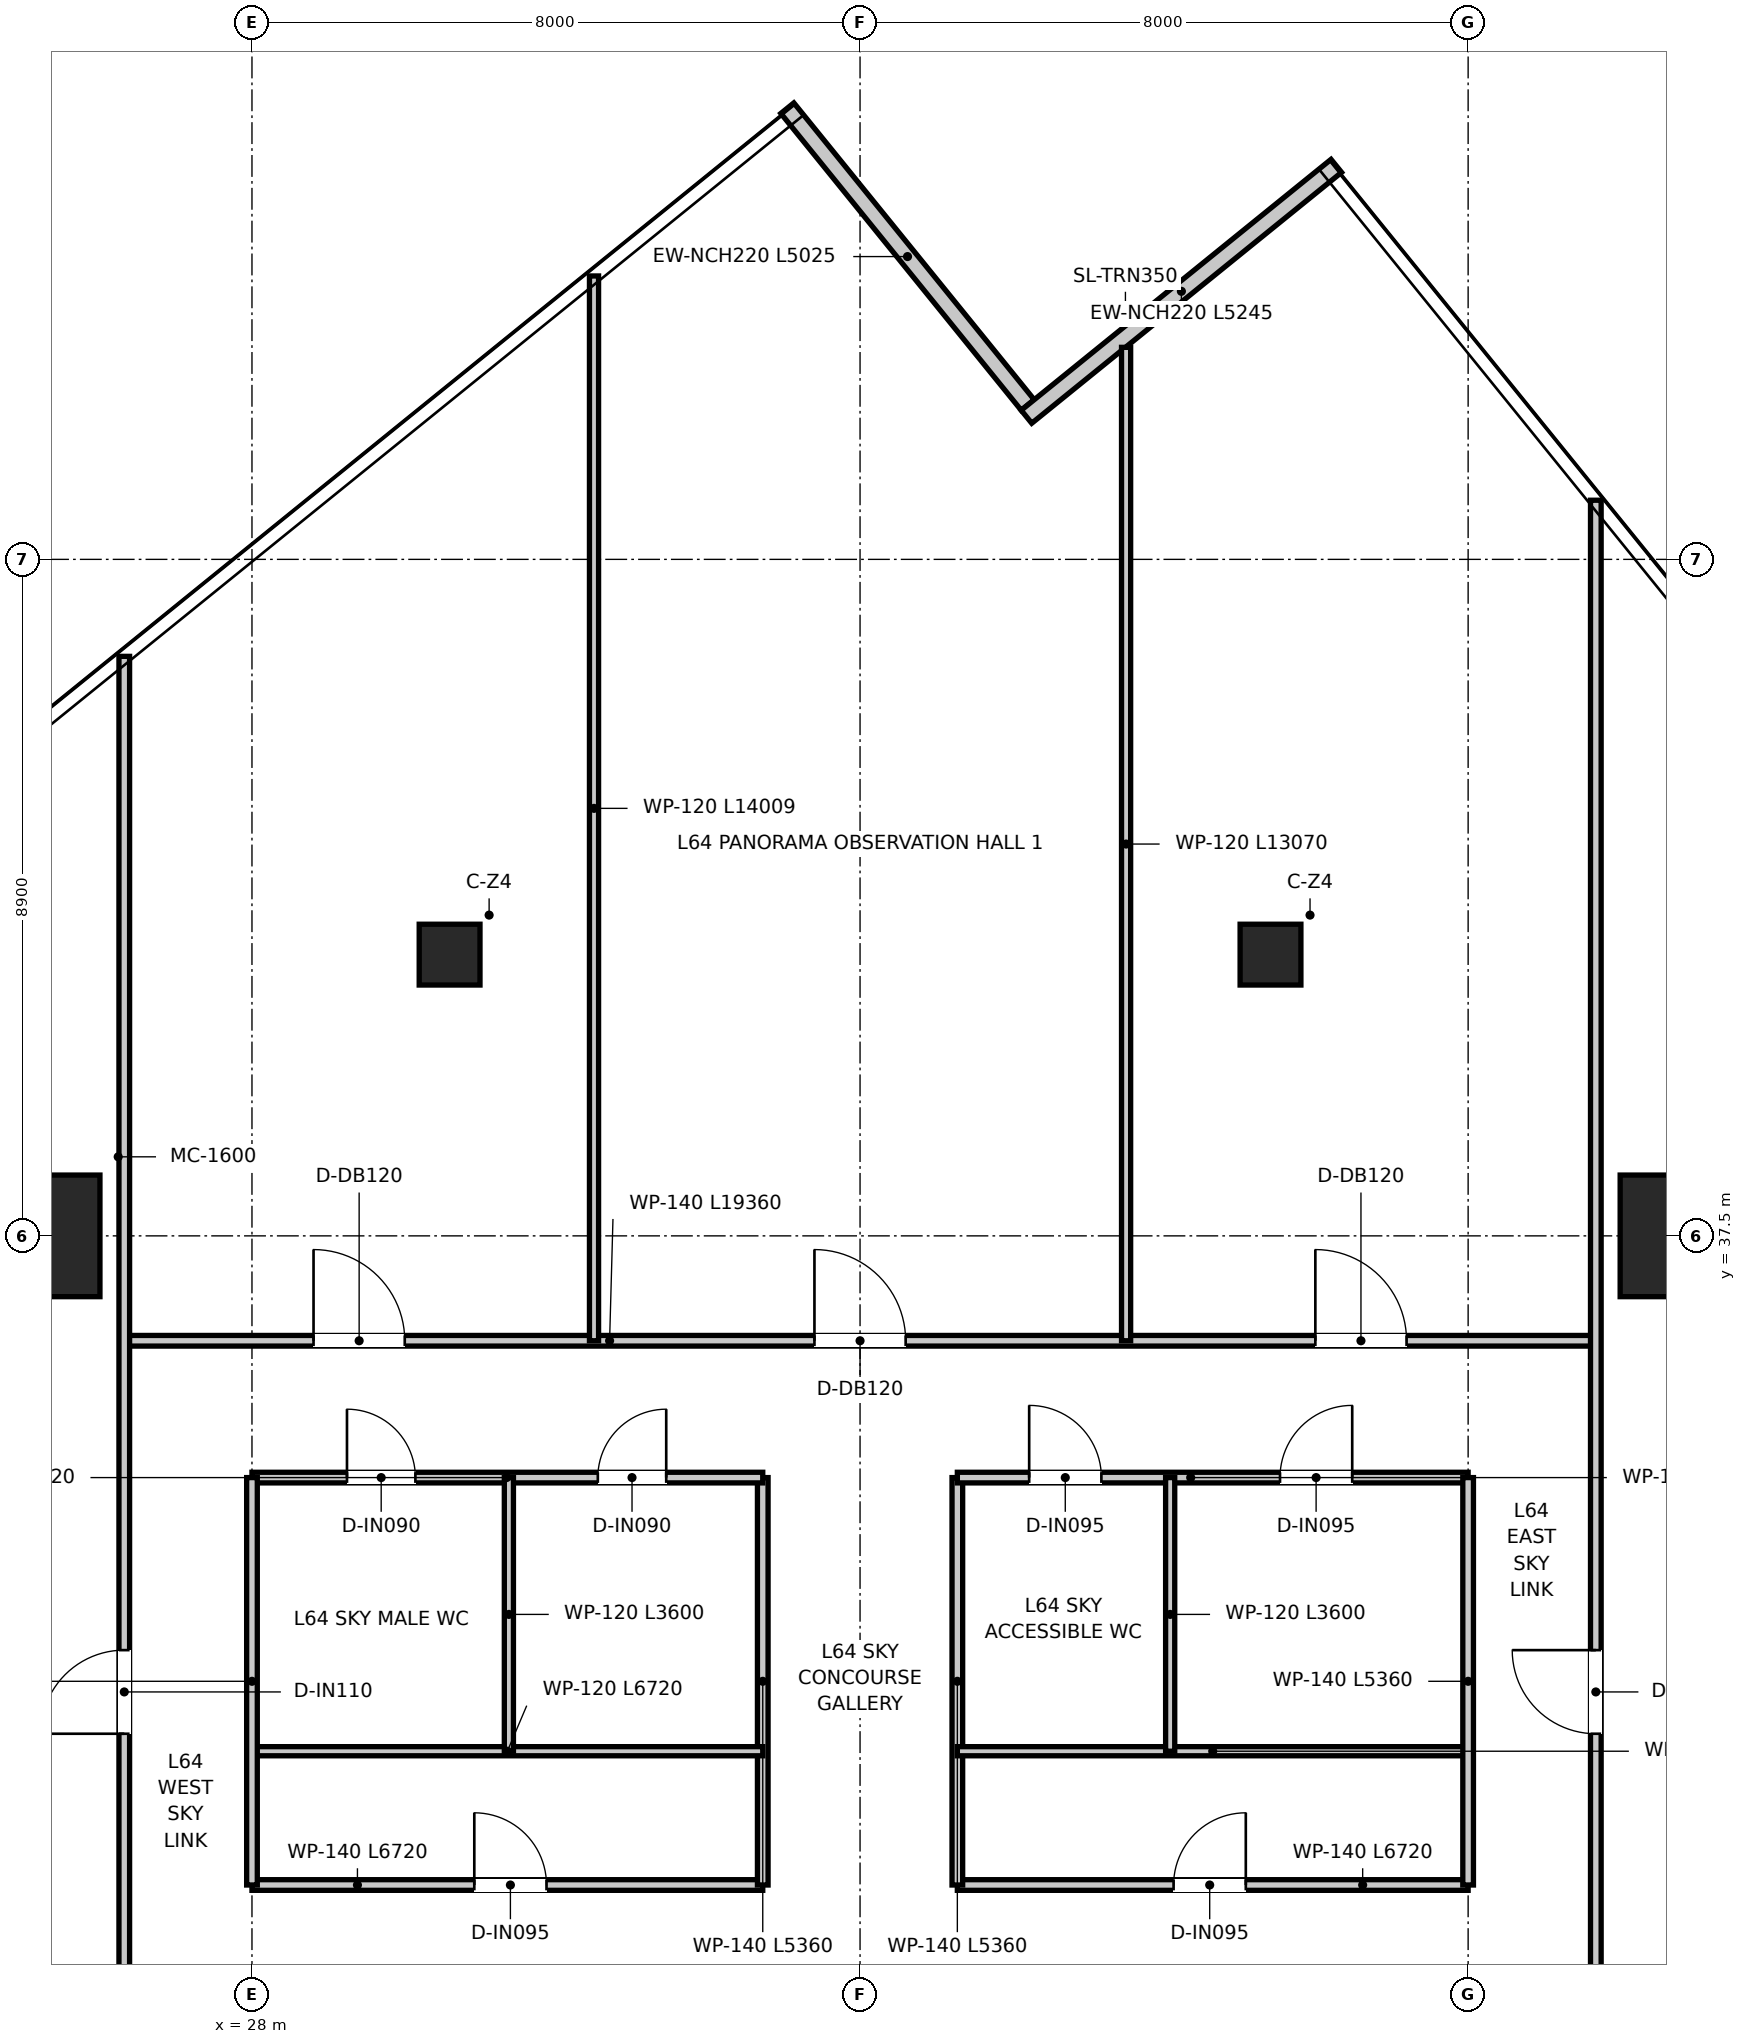
"""IFC4 building model, lengths in metres.
Left out: names, types, materials, properties, quantities, classifications, styles, units other than length and angle.
Written with IfcOpenShell. Run it as: python <this file> out.ifc"""

import sys

from ifc_helpers import new_model, si_unit, direction, frame, frame_2d, origin, origin_2d, place, context, subcontext, project, spatial, rectangle, extrude, source, transform, mapped, element, fill, save


model = new_model("IFC4")
c1 = context("Model", 3, precision=1e-05, world=origin(), true_north=direction((0.0, 1.0)))
c2 = subcontext(c1, "Body", "Model", "MODEL_VIEW")
j1 = project(units=[si_unit("LENGTHUNIT", "METRE"), si_unit("PLANEANGLEUNIT", "RADIAN")], contexts=[c1])
p1 = place(None, origin())
s1 = spatial("IfcSite", under=j1, at=p1, CompositionType="ELEMENT")
p2 = place(p1, origin())
s2 = spatial("IfcBuilding", under=s1, at=p2, CompositionType="ELEMENT")
p3 = place(p2, frame((0.0, 0.0, 262.6)))
s3 = spatial("IfcBuildingStorey", under=s2, at=p3, CompositionType="ELEMENT", Elevation=262.6)
m1 = source(origin(), c2, "Body", "SweptSolid", [
    extrude(rectangle(XDim=1.6, YDim=1.6, at=origin_2d()), origin(), (0.0, 0.0, 1.0), 4.8),
])
for number, where, z_axis, x_axis in (
    (1, (46.8, 37.5, 0.0), (0.0, 0.0, 1.0), (1.0, 0.0, 0.0)),
    (2, (25.2, 37.5, 0.0), (0.0, 0.0, 1.0), (1.0, 0.0, 0.0)),
):
    element("IfcColumn", number, at=place(p3, frame(where, z_axis=z_axis, x_axis=x_axis)), inside=s3, PredefinedType="USERDEFINED", context=c2, shape_type="MappedRepresentation", body=[
        mapped(m1, transform((0.0, 0.0, 0.0), x_axis=(1.0, 0.0, 0.0), y_axis=(0.0, 1.0, 0.0), z_axis=(0.0, 0.0, 1.0), scale=1.0)),
    ])
m2 = source(origin(), c2, "Body", "SweptSolid", [
    extrude(rectangle(XDim=0.8, YDim=0.8, at=origin_2d()), origin(), (0.0, 0.0, 1.0), 4.8),
])
for number, where, z_axis, x_axis in (
    (3, (30.6, 41.2, 0.0), (0.0, 0.0, 1.0), (1.0, 0.0, 0.0)),
    (4, (41.4, 41.2, 0.0), (0.0, 0.0, 1.0), (1.0, 0.0, 0.0)),
):
    element("IfcColumn", number, at=place(p3, frame(where, z_axis=z_axis, x_axis=x_axis)), inside=s3, PredefinedType="COLUMN", context=c2, shape_type="MappedRepresentation", body=[
        mapped(m2, transform((0.0, 0.0, 0.0), x_axis=(1.0, 0.0, 0.0), y_axis=(0.0, 1.0, 0.0), z_axis=(0.0, 0.0, 1.0), scale=1.0)),
    ])
p4 = place(p3, frame((38.206, 48.431, 0.0), z_axis=(0.0, 0.0, 1.0), x_axis=(-0.629311429887, 0.777153217978, 0.0)))
e5 = element("IfcWall", 5, at=p4, inside=s3, PredefinedType="ELEMENTEDWALL", context=c2, shape_type="SweptSolid", body=[
    extrude(rectangle(XDim=5.025, YDim=0.22, at=frame_2d((2.513, 0.0))), origin(), (0.0, 0.0, 1.0), 4.52),
])
p5 = place(p3, frame((42.266, 51.577, 0.0), z_axis=(0.0, 0.0, 1.0), x_axis=(-0.777149472214, -0.629316055602, 0.0)))
e6 = element("IfcWall", 6, at=p5, inside=s3, PredefinedType="ELEMENTEDWALL", context=c2, shape_type="SweptSolid", body=[
    extrude(rectangle(XDim=5.245, YDim=0.22, at=frame_2d((2.623, 0.0))), origin(), (0.0, 0.0, 1.0), 4.52),
])
p6 = place(p3, frame((28.0, 28.96, 0.0), z_axis=(0.0, 0.0, 1.0), x_axis=(1.0, 0.0, 0.0)))
e7 = element("IfcWall", 7, at=p6, inside=s3, PredefinedType="PARTITIONING", context=c2, shape_type="SweptSolid", body=[
    extrude(rectangle(XDim=6.72, YDim=0.14, at=frame_2d((3.36, 0.0))), origin(), (0.0, 0.0, 1.0), 4.03),
])
p7 = place(p6, frame((2.925, 0.0, 0.0)))
e8 = element("IfcOpeningElement", 8, at=p7, cuts=e7, PredefinedType="OPENING", context=c2, shape_type="SweptSolid", body=[
    extrude(rectangle(XDim=0.95, YDim=2.1, at=frame_2d((0.475, 1.05))), frame((0.0, 0.08, 0.0), z_axis=(0.0, -1.0, 0.0), x_axis=(1.0, 0.0, 0.0)), (0.0, 0.0, 1.0), 0.16),
])
p8 = place(p3, frame((37.28, 28.96, 0.0), z_axis=(0.0, 0.0, 1.0), x_axis=(1.0, 0.0, 0.0)))
e9 = element("IfcWall", 9, at=p8, inside=s3, PredefinedType="PARTITIONING", context=c2, shape_type="SweptSolid", body=[
    extrude(rectangle(XDim=6.72, YDim=0.14, at=frame_2d((3.36, 0.0))), origin(), (0.0, 0.0, 1.0), 4.03),
])
p9 = place(p8, frame((2.845, 0.0, 0.0)))
e10 = element("IfcOpeningElement", 10, at=p9, cuts=e9, PredefinedType="OPENING", context=c2, shape_type="SweptSolid", body=[
    extrude(rectangle(XDim=0.95, YDim=2.1, at=frame_2d((0.475, 1.05))), frame((0.0, 0.08, 0.0), z_axis=(0.0, -1.0, 0.0), x_axis=(1.0, 0.0, 0.0)), (0.0, 0.0, 1.0), 0.16),
])
for number, where, z_axis, x_axis in (
    (11, (34.72, 28.96, 0.0), (0.0, 0.0, 1.0), (0.0, 1.0, 0.0)),
    (12, (37.28, 28.96, 0.0), (0.0, 0.0, 1.0), (0.0, 1.0, 0.0)),
):
    element("IfcWall", number, at=place(p3, frame(where, z_axis=z_axis, x_axis=x_axis)), inside=s3, PredefinedType="PARTITIONING", context=c2, shape_type="SweptSolid", body=[
        extrude(rectangle(XDim=5.36, YDim=0.14, at=frame_2d((2.68, 0.0))), origin(), (0.0, 0.0, 1.0), 4.12),
    ])
for number, where, z_axis, x_axis in (
    (13, (28.0, 30.72, 0.0), (0.0, 0.0, 1.0), (1.0, 0.0, 0.0)),
    (14, (37.28, 30.72, 0.0), (0.0, 0.0, 1.0), (1.0, 0.0, 0.0)),
):
    element("IfcWall", number, at=place(p3, frame(where, z_axis=z_axis, x_axis=x_axis)), inside=s3, PredefinedType="PARTITIONING", context=c2, shape_type="SweptSolid", body=[
        extrude(rectangle(XDim=6.72, YDim=0.12, at=frame_2d((3.36, 0.0))), origin(), (0.0, 0.0, 1.0), 4.03),
    ])
p10 = place(p3, frame((28.0, 34.32, 0.0), z_axis=(0.0, 0.0, 1.0), x_axis=(1.0, 0.0, 0.0)))
e15 = element("IfcWall", 15, at=p10, inside=s3, PredefinedType="PARTITIONING", context=c2, shape_type="SweptSolid", body=[
    extrude(rectangle(XDim=6.72, YDim=0.14, at=frame_2d((3.36, 0.0))), origin(), (0.0, 0.0, 1.0), 4.03),
])
p11 = place(p10, frame((1.25, 0.0, 0.0)))
e16 = element("IfcOpeningElement", 16, at=p11, cuts=e15, PredefinedType="OPENING", context=c2, shape_type="SweptSolid", body=[
    extrude(rectangle(XDim=0.9, YDim=2.1, at=frame_2d((0.45, 1.05))), frame((0.0, 0.08, 0.0), z_axis=(0.0, -1.0, 0.0), x_axis=(1.0, 0.0, 0.0)), (0.0, 0.0, 1.0), 0.16),
])
p12 = place(p10, frame((4.55, 0.0, 0.0)))
e17 = element("IfcOpeningElement", 17, at=p12, cuts=e15, PredefinedType="OPENING", context=c2, shape_type="SweptSolid", body=[
    extrude(rectangle(XDim=0.9, YDim=2.1, at=frame_2d((0.45, 1.05))), frame((0.0, 0.08, 0.0), z_axis=(0.0, -1.0, 0.0), x_axis=(1.0, 0.0, 0.0)), (0.0, 0.0, 1.0), 0.16),
])
p13 = place(p3, frame((37.28, 34.32, 0.0), z_axis=(0.0, 0.0, 1.0), x_axis=(1.0, 0.0, 0.0)))
e18 = element("IfcWall", 18, at=p13, inside=s3, PredefinedType="PARTITIONING", context=c2, shape_type="SweptSolid", body=[
    extrude(rectangle(XDim=6.72, YDim=0.14, at=frame_2d((3.36, 0.0))), origin(), (0.0, 0.0, 1.0), 4.03),
])
p14 = place(p13, frame((0.945, 0.0, 0.0)))
e19 = element("IfcOpeningElement", 19, at=p14, cuts=e18, PredefinedType="OPENING", context=c2, shape_type="SweptSolid", body=[
    extrude(rectangle(XDim=0.95, YDim=2.1, at=frame_2d((0.475, 1.05))), frame((0.0, 0.08, 0.0), z_axis=(0.0, -1.0, 0.0), x_axis=(1.0, 0.0, 0.0)), (0.0, 0.0, 1.0), 0.16),
])
p15 = place(p13, frame((4.245, 0.0, 0.0)))
e20 = element("IfcOpeningElement", 20, at=p15, cuts=e18, PredefinedType="OPENING", context=c2, shape_type="SweptSolid", body=[
    extrude(rectangle(XDim=0.95, YDim=2.1, at=frame_2d((0.475, 1.05))), frame((0.0, 0.08, 0.0), z_axis=(0.0, -1.0, 0.0), x_axis=(1.0, 0.0, 0.0)), (0.0, 0.0, 1.0), 0.16),
])
for number, where, z_axis, x_axis in (
    (21, (28.0, 28.96, 0.0), (0.0, 0.0, 1.0), (0.0, 1.0, 0.0)),
    (22, (44.0, 28.96, 0.0), (0.0, 0.0, 1.0), (0.0, 1.0, 0.0)),
):
    element("IfcWall", number, at=place(p3, frame(where, z_axis=z_axis, x_axis=x_axis)), inside=s3, PredefinedType="PARTITIONING", context=c2, shape_type="SweptSolid", body=[
        extrude(rectangle(XDim=5.36, YDim=0.14, at=frame_2d((2.68, 0.0))), origin(), (0.0, 0.0, 1.0), 4.22),
    ])
for number, where, z_axis, x_axis in (
    (23, (31.38, 30.72, 0.0), (0.0, 0.0, 1.0), (0.0, 1.0, 0.0)),
    (24, (40.08, 30.72, 0.0), (0.0, 0.0, 1.0), (0.0, 1.0, 0.0)),
):
    element("IfcWall", number, at=place(p3, frame(where, z_axis=z_axis, x_axis=x_axis)), inside=s3, PredefinedType="PARTITIONING", context=c2, shape_type="SweptSolid", body=[
        extrude(rectangle(XDim=3.6, YDim=0.12, at=frame_2d((1.8, 0.0))), origin(), (0.0, 0.0, 1.0), 4.12),
    ])
p16 = place(p3, frame((26.32, 36.12, 0.0), z_axis=(0.0, 0.0, 1.0), x_axis=(1.0, 0.0, 0.0)))
e25 = element("IfcWall", 25, at=p16, inside=s3, PredefinedType="PARTITIONING", context=c2, shape_type="SweptSolid", body=[
    extrude(rectangle(XDim=19.36, YDim=0.14, at=frame_2d((9.68, 0.0))), origin(), (0.0, 0.0, 1.0), 4.03),
])
p17 = place(p16, frame((2.49, 0.0, 0.0)))
e26 = element("IfcOpeningElement", 26, at=p17, cuts=e25, PredefinedType="OPENING", context=c2, shape_type="SweptSolid", body=[
    extrude(rectangle(XDim=1.2, YDim=2.15, at=frame_2d((0.6, 1.075))), frame((0.0, 0.08, 0.0), z_axis=(0.0, -1.0, 0.0), x_axis=(1.0, 0.0, 0.0)), (0.0, 0.0, 1.0), 0.16),
])
p18 = place(p16, frame((9.08, 0.0, 0.0)))
e27 = element("IfcOpeningElement", 27, at=p18, cuts=e25, PredefinedType="OPENING", context=c2, shape_type="SweptSolid", body=[
    extrude(rectangle(XDim=1.2, YDim=2.15, at=frame_2d((0.6, 1.075))), frame((0.0, 0.08, 0.0), z_axis=(0.0, -1.0, 0.0), x_axis=(1.0, 0.0, 0.0)), (0.0, 0.0, 1.0), 0.16),
])
p19 = place(p16, frame((15.67, 0.0, 0.0)))
e28 = element("IfcOpeningElement", 28, at=p19, cuts=e25, PredefinedType="OPENING", context=c2, shape_type="SweptSolid", body=[
    extrude(rectangle(XDim=1.2, YDim=2.15, at=frame_2d((0.6, 1.075))), frame((0.0, 0.08, 0.0), z_axis=(0.0, -1.0, 0.0), x_axis=(1.0, 0.0, 0.0)), (0.0, 0.0, 1.0), 0.16),
])
p20 = place(p3, frame((26.32, 10.5, 0.0), z_axis=(0.0, 0.0, 1.0), x_axis=(0.0, 1.0, 0.0)))
e29 = element("IfcWall", 29, at=p20, inside=s3, PredefinedType="PARTITIONING", context=c2, shape_type="SweptSolid", body=[
    extrude(rectangle(XDim=34.624, YDim=0.14, at=frame_2d((17.312, 0.0))), origin(), (0.0, 0.0, 1.0), 3.88),
])
p21 = place(p20, frame((20.45, 0.0, 0.0)))
e30 = element("IfcOpeningElement", 30, at=p21, cuts=e29, PredefinedType="OPENING", context=c2, shape_type="SweptSolid", body=[
    extrude(rectangle(XDim=1.1, YDim=2.15, at=frame_2d((0.55, 1.075))), frame((0.0, 0.08, 0.0), z_axis=(0.0, -1.0, 0.0), x_axis=(1.0, 0.0, 0.0)), (0.0, 0.0, 1.0), 0.16),
])
p22 = place(p3, frame((45.68, 8.276, 0.0), z_axis=(0.0, 0.0, 1.0), x_axis=(0.0, 1.0, 0.0)))
e31 = element("IfcWall", 31, at=p22, inside=s3, PredefinedType="PARTITIONING", context=c2, shape_type="SweptSolid", body=[
    extrude(rectangle(XDim=38.902, YDim=0.14, at=frame_2d((19.451, 0.0))), origin(), (0.0, 0.0, 1.0), 3.88),
])
p23 = place(p22, frame((22.674, 0.0, 0.0)))
e32 = element("IfcOpeningElement", 32, at=p23, cuts=e31, PredefinedType="OPENING", context=c2, shape_type="SweptSolid", body=[
    extrude(rectangle(XDim=1.1, YDim=2.15, at=frame_2d((0.55, 1.075))), frame((0.0, 0.08, 0.0), z_axis=(0.0, -1.0, 0.0), x_axis=(1.0, 0.0, 0.0)), (0.0, 0.0, 1.0), 0.16),
])
p24 = place(p3, frame((32.5, 36.12, 0.0), z_axis=(0.0, 0.0, 1.0), x_axis=(0.0, 1.0, 0.0)))
e33 = element("IfcWall", 33, at=p24, inside=s3, PredefinedType="PARTITIONING", context=c2, shape_type="SweptSolid", body=[
    extrude(rectangle(XDim=14.008, YDim=0.12, at=frame_2d((7.004, 0.0))), origin(), (0.0, 0.0, 1.0), 3.88),
])
p25 = place(p3, frame((39.5, 36.12, 0.0), z_axis=(0.0, 0.0, 1.0), x_axis=(0.0, 1.0, 0.0)))
e34 = element("IfcWall", 34, at=p25, inside=s3, PredefinedType="PARTITIONING", context=c2, shape_type="SweptSolid", body=[
    extrude(rectangle(XDim=13.069, YDim=0.12, at=frame_2d((6.535, 0.0))), origin(), (0.0, 0.0, 1.0), 3.88),
])
p26 = place(p7, origin())
e35 = element("IfcDoor", 35, at=p26, inside=s3, OperationType="SINGLE_SWING_LEFT", PredefinedType="DOOR", context=c2, shape_type="SweptSolid", body=[
    extrude(rectangle(XDim=0.95, YDim=2.1, at=frame_2d((0.475, 1.05))), frame((0.0, 0.025, 0.0), z_axis=(0.0, -1.0, 0.0), x_axis=(1.0, 0.0, 0.0)), (0.0, 0.0, 1.0), 0.05),
])
fill(e8, e35)
p27 = place(p9, origin())
e36 = element("IfcDoor", 36, at=p27, inside=s3, OperationType="SINGLE_SWING_RIGHT", PredefinedType="DOOR", context=c2, shape_type="SweptSolid", body=[
    extrude(rectangle(XDim=0.95, YDim=2.1, at=frame_2d((0.475, 1.05))), frame((0.0, 0.025, 0.0), z_axis=(0.0, -1.0, 0.0), x_axis=(1.0, 0.0, 0.0)), (0.0, 0.0, 1.0), 0.05),
])
fill(e10, e36)
p28 = place(p11, origin())
e37 = element("IfcDoor", 37, at=p28, inside=s3, OperationType="SINGLE_SWING_LEFT", PredefinedType="DOOR", context=c2, shape_type="SweptSolid", body=[
    extrude(rectangle(XDim=0.9, YDim=2.1, at=frame_2d((0.45, 1.05))), frame((0.0, 0.025, 0.0), z_axis=(0.0, -1.0, 0.0), x_axis=(1.0, 0.0, 0.0)), (0.0, 0.0, 1.0), 0.05),
])
fill(e16, e37)
p29 = place(p12, origin())
e38 = element("IfcDoor", 38, at=p29, inside=s3, OperationType="SINGLE_SWING_RIGHT", PredefinedType="DOOR", context=c2, shape_type="SweptSolid", body=[
    extrude(rectangle(XDim=0.9, YDim=2.1, at=frame_2d((0.45, 1.05))), frame((0.0, 0.025, 0.0), z_axis=(0.0, -1.0, 0.0), x_axis=(1.0, 0.0, 0.0)), (0.0, 0.0, 1.0), 0.05),
])
fill(e17, e38)
p30 = place(p14, origin())
e39 = element("IfcDoor", 39, at=p30, inside=s3, OperationType="SINGLE_SWING_LEFT", PredefinedType="DOOR", context=c2, shape_type="SweptSolid", body=[
    extrude(rectangle(XDim=0.95, YDim=2.1, at=frame_2d((0.475, 1.05))), frame((0.0, 0.025, 0.0), z_axis=(0.0, -1.0, 0.0), x_axis=(1.0, 0.0, 0.0)), (0.0, 0.0, 1.0), 0.05),
])
fill(e19, e39)
p31 = place(p15, origin())
e40 = element("IfcDoor", 40, at=p31, inside=s3, OperationType="SINGLE_SWING_RIGHT", PredefinedType="DOOR", context=c2, shape_type="SweptSolid", body=[
    extrude(rectangle(XDim=0.95, YDim=2.1, at=frame_2d((0.475, 1.05))), frame((0.0, 0.025, 0.0), z_axis=(0.0, -1.0, 0.0), x_axis=(1.0, 0.0, 0.0)), (0.0, 0.0, 1.0), 0.05),
])
fill(e20, e40)
p32 = place(p17, origin())
e41 = element("IfcDoor", 41, at=p32, inside=s3, OperationType="SINGLE_SWING_LEFT", PredefinedType="DOOR", context=c2, shape_type="SweptSolid", body=[
    extrude(rectangle(XDim=1.2, YDim=2.15, at=frame_2d((0.6, 1.075))), frame((0.0, 0.025, 0.0), z_axis=(0.0, -1.0, 0.0), x_axis=(1.0, 0.0, 0.0)), (0.0, 0.0, 1.0), 0.05),
])
fill(e26, e41)
p33 = place(p18, origin())
e42 = element("IfcDoor", 42, at=p33, inside=s3, OperationType="SINGLE_SWING_LEFT", PredefinedType="DOOR", context=c2, shape_type="SweptSolid", body=[
    extrude(rectangle(XDim=1.2, YDim=2.15, at=frame_2d((0.6, 1.075))), frame((0.0, 0.025, 0.0), z_axis=(0.0, -1.0, 0.0), x_axis=(1.0, 0.0, 0.0)), (0.0, 0.0, 1.0), 0.05),
])
fill(e27, e42)
p34 = place(p19, origin())
e43 = element("IfcDoor", 43, at=p34, inside=s3, OperationType="SINGLE_SWING_LEFT", PredefinedType="DOOR", context=c2, shape_type="SweptSolid", body=[
    extrude(rectangle(XDim=1.2, YDim=2.15, at=frame_2d((0.6, 1.075))), frame((0.0, 0.025, 0.0), z_axis=(0.0, -1.0, 0.0), x_axis=(1.0, 0.0, 0.0)), (0.0, 0.0, 1.0), 0.05),
])
fill(e28, e43)
p35 = place(p21, origin())
e44 = element("IfcDoor", 44, at=p35, inside=s3, OperationType="SINGLE_SWING_LEFT", PredefinedType="DOOR", context=c2, shape_type="SweptSolid", body=[
    extrude(rectangle(XDim=1.1, YDim=2.15, at=frame_2d((0.55, 1.075))), frame((0.0, 0.025, 0.0), z_axis=(0.0, -1.0, 0.0), x_axis=(1.0, 0.0, 0.0)), (0.0, 0.0, 1.0), 0.05),
])
fill(e30, e44)
p36 = place(p23, origin())
e45 = element("IfcDoor", 45, at=p36, inside=s3, OperationType="SINGLE_SWING_RIGHT", PredefinedType="DOOR", context=c2, shape_type="SweptSolid", body=[
    extrude(rectangle(XDim=1.1, YDim=2.15, at=frame_2d((0.55, 1.075))), frame((0.0, 0.025, 0.0), z_axis=(0.0, -1.0, 0.0), x_axis=(1.0, 0.0, 0.0)), (0.0, 0.0, 1.0), 0.05),
])
fill(e32, e45)
save(model, sys.argv[1])
